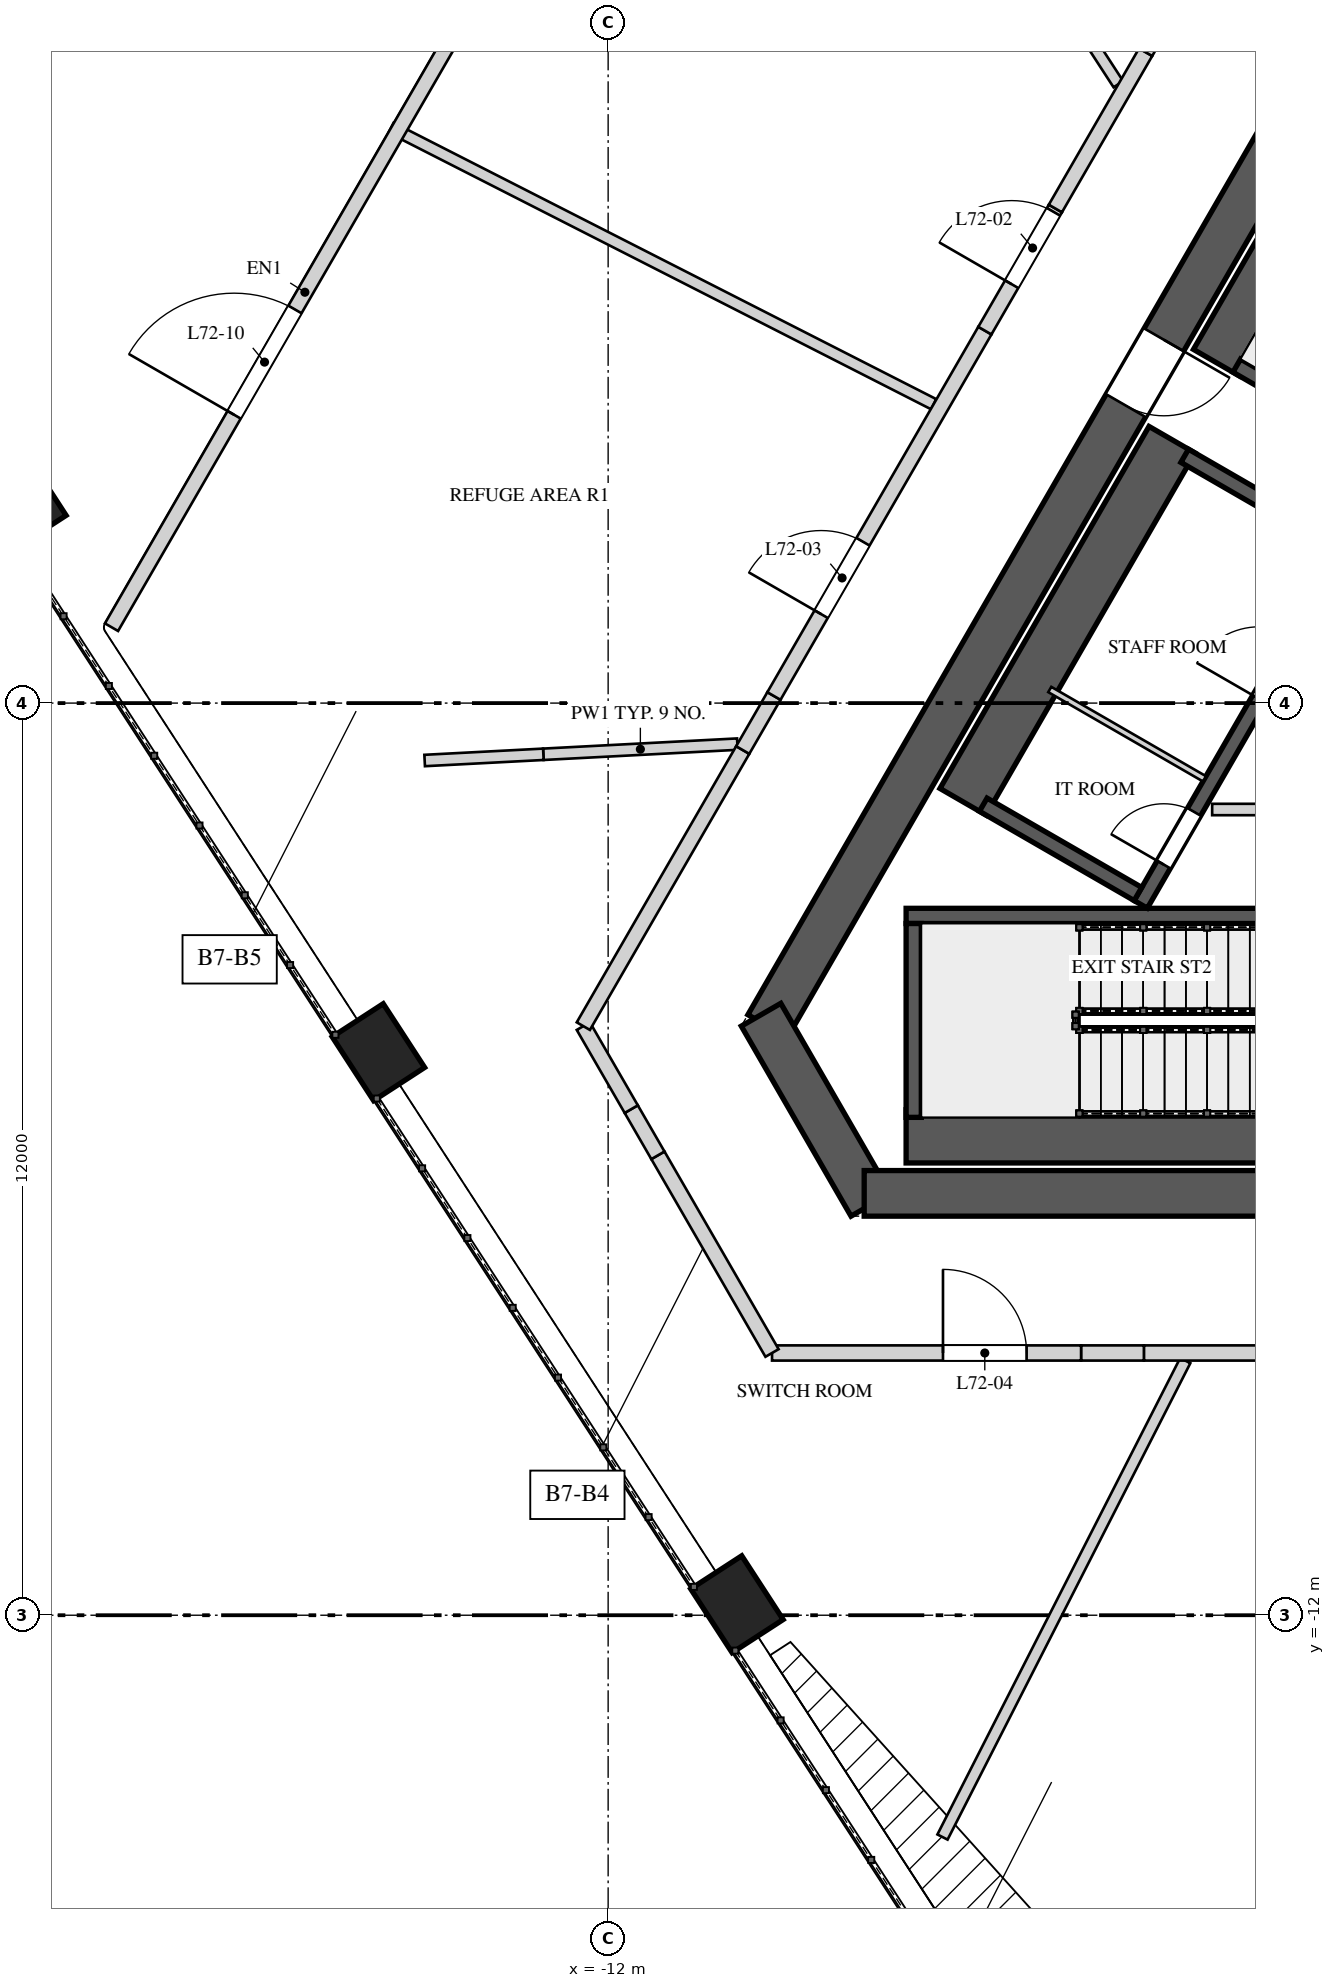
"""IFC4 building model, lengths in metres.
Left out: names, types, materials, properties, quantities, classifications, styles, units other than length and angle.
Written with IfcOpenShell. Run it as: python <this file> out.ifc"""

import sys

from ifc_helpers import new_model, si_unit, direction, frame, frame_2d, origin, origin_2d, place, context, subcontext, project, spatial, polyline, rectangle, outline, extrude, element, fill, save


model = new_model("IFC4")
c1 = context("Model", 3, precision=1e-05, world=origin(), true_north=direction((0.0, 1.0)))
c2 = subcontext(c1, "Body", "Model", "MODEL_VIEW")
j1 = project(units=[si_unit("LENGTHUNIT", "METRE"), si_unit("PLANEANGLEUNIT", "RADIAN")], contexts=[c1])
p1 = place(None, origin())
s1 = spatial("IfcSite", under=j1, at=p1, CompositionType="ELEMENT")
p2 = place(p1, origin())
s2 = spatial("IfcBuilding", under=s1, at=p2, CompositionType="ELEMENT")
p3 = place(p2, frame((0.0, 0.0, 306.4)))
s3 = spatial("IfcBuildingStorey", under=s2, at=p3, CompositionType="ELEMENT", Elevation=306.4)
p4 = place(p3, frame((-1.27, 10.7, 0.0), z_axis=(0.0, 0.0, 1.0), x_axis=(-0.499999536116, -0.866025671608, 0.0)))
e1 = element("IfcWall", 1, at=p4, inside=s3, PredefinedType="SHEAR", context=c2, shape_type="SweptSolid", body=[
    extrude(rectangle(XDim=17.263, YDim=0.6, at=frame_2d((8.631, 0.0))), origin(), (0.0, 0.0, 1.0), 14.0),
])
p5 = place(p4, frame((6.836, 0.0, 0.0)))
e2 = element("IfcOpeningElement", 2, at=p5, cuts=e1, PredefinedType="OPENING", context=c2, shape_type="SweptSolid", body=[
    extrude(rectangle(XDim=1.0, YDim=2.4, at=frame_2d((0.5, 1.2))), frame((0.0, 0.31, 0.0), z_axis=(0.0, -1.0, 0.0), x_axis=(1.0, 0.0, 0.0)), (0.0, 0.0, 1.0), 0.62),
])
p6 = place(p3, frame((-9.988, -4.1, 0.0), z_axis=(0.0, 0.0, 1.0), x_axis=(0.499995765644, -0.866027848477, 0.0)))
e3 = element("IfcWall", 3, at=p6, inside=s3, PredefinedType="SHEAR", context=c2, shape_type="SweptSolid", body=[
    extrude(rectangle(XDim=2.887, YDim=0.6, at=frame_2d((1.443, 0.0))), origin(), (0.0, 0.0, 1.0), 14.0),
])
p7 = place(p3, frame((-8.631, -6.45, 0.0), z_axis=(0.0, 0.0, 1.0), x_axis=(1.0, 0.0, 0.0)))
e4 = element("IfcWall", 4, at=p7, inside=s3, PredefinedType="SHEAR", context=c2, shape_type="SweptSolid", body=[
    extrude(rectangle(XDim=17.263, YDim=0.6, at=frame_2d((8.631, 0.0))), origin(), (0.0, 0.0, 1.0), 14.0),
])
p8 = place(p7, frame((6.836, 0.0, 0.0)))
e5 = element("IfcOpeningElement", 5, at=p8, cuts=e4, PredefinedType="OPENING", context=c2, shape_type="SweptSolid", body=[
    extrude(rectangle(XDim=1.0, YDim=2.4, at=frame_2d((0.5, 1.2))), frame((0.0, 0.31, 0.0), z_axis=(0.0, -1.0, 0.0), x_axis=(1.0, 0.0, 0.0)), (0.0, 0.0, 1.0), 0.62),
])
p9 = place(p7, frame((15.034, 0.0, 0.0)))
e6 = element("IfcOpeningElement", 6, at=p9, cuts=e4, PredefinedType="OPENING", context=c2, shape_type="SweptSolid", body=[
    extrude(rectangle(XDim=0.8, YDim=2.1, at=frame_2d((0.4, 1.05))), frame((0.0, 0.31, 0.0), z_axis=(0.0, -1.0, 0.0), x_axis=(1.0, 0.0, 0.0)), (0.0, 0.0, 1.0), 0.62),
])
for number, where, z_axis, x_axis in (
    (7, (-19.739, 2.671, 0.0), (0.0, 0.0, 1.0), (0.545, -0.839, 0.0)),
    (8, (-15.022, -4.593, 0.0), (0.0, 0.0, 1.0), (0.545, -0.839, 0.0)),
    (9, (-10.306, -11.856, 0.0), (0.0, 0.0, 1.0), (0.545, -0.839, 0.0)),
):
    element("IfcColumn", number, at=place(p3, frame(where, z_axis=z_axis, x_axis=x_axis)), inside=s3, PredefinedType="COLUMN", context=c2, shape_type="SweptSolid", body=[
        extrude(rectangle(XDim=1.0, YDim=0.8, at=origin_2d()), origin(), (0.0, 0.0, 1.0), 9.037),
    ])
p10 = place(p3, frame((-0.896, 9.847, 0.0), z_axis=(0.0, 0.0, 1.0), x_axis=(-0.500009909098, -0.866019682689, 0.0)))
e10 = element("IfcWall", 10, at=p10, inside=s3, PredefinedType="SOLIDWALL", context=c2, shape_type="SweptSolid", body=[
    extrude(rectangle(XDim=6.2, YDim=0.7, at=frame_2d((3.1, 0.0))), origin(), (0.0, 0.0, 1.0), 13.65),
])
p11 = place(p3, frame((-1.521, 3.165, 0.0), z_axis=(0.0, 0.0, 1.0), x_axis=(-0.866030925526, 0.499990435942, 0.0)))
e11 = element("IfcWall", 11, at=p11, inside=s3, PredefinedType="SOLIDWALL", context=c2, shape_type="SweptSolid", body=[
    extrude(rectangle(XDim=2.55, YDim=0.2, at=frame_2d((1.275, 0.0))), origin(), (0.0, 0.0, 1.0), 13.65),
])
p12 = place(p11, frame((0.725, 0.0, 0.0)))
e12 = element("IfcOpeningElement", 12, at=p12, cuts=e11, PredefinedType="OPENING", context=c2, shape_type="SweptSolid", body=[
    extrude(rectangle(XDim=1.1, YDim=2.4, at=frame_2d((0.55, 1.2))), frame((0.0, 0.11, 0.0), z_axis=(0.0, -1.0, 0.0), x_axis=(1.0, 0.0, 0.0)), (0.0, 0.0, 1.0), 0.22),
])
p13 = place(p3, frame((-8.08, -5.7, 0.0), z_axis=(0.0, 0.0, 1.0), x_axis=(1.0, 0.0, 0.0)))
e13 = element("IfcWall", 13, at=p13, inside=s3, PredefinedType="SOLIDWALL", context=c2, shape_type="SweptSolid", body=[
    extrude(rectangle(XDim=6.2, YDim=0.7, at=frame_2d((3.1, 0.0))), origin(), (0.0, 0.0, 1.0), 13.65),
])
p14 = place(p3, frame((-8.08, -2.8, 0.0), z_axis=(0.0, 0.0, 1.0), x_axis=(1.0, 0.0, 0.0)))
e14 = element("IfcWall", 14, at=p14, inside=s3, PredefinedType="SOLIDWALL", context=c2, shape_type="SweptSolid", body=[
    extrude(rectangle(XDim=6.2, YDim=0.2, at=frame_2d((3.1, 0.0))), origin(), (0.0, 0.0, 1.0), 13.65),
])
p15 = place(p3, frame((-7.98, -2.9, 0.0), z_axis=(0.0, 0.0, 1.0), x_axis=(0.0, -1.0, 0.0)))
e15 = element("IfcWall", 15, at=p15, inside=s3, PredefinedType="SOLIDWALL", context=c2, shape_type="SweptSolid", body=[
    extrude(rectangle(XDim=2.55, YDim=0.2, at=frame_2d((1.275, 0.0))), origin(), (0.0, 0.0, 1.0), 13.65),
])
p16 = place(p3, frame((-4.993, -2.648, 0.0), z_axis=(0.0, 0.0, 1.0), x_axis=(0.499996545922, 0.866027397988, 0.0)))
e16 = element("IfcWall", 16, at=p16, inside=s3, PredefinedType="SOLIDWALL", context=c2, shape_type="SweptSolid", body=[
    extrude(rectangle(XDim=5.5, YDim=0.2, at=frame_2d((2.75, 0.0))), origin(), (0.0, 0.0, 1.0), 13.65),
])
p17 = place(p16, frame((3.12, 0.0, 0.0)))
e17 = element("IfcOpeningElement", 17, at=p17, cuts=e16, PredefinedType="OPENING", context=c2, shape_type="SweptSolid", body=[
    extrude(rectangle(XDim=0.95, YDim=2.4, at=frame_2d((0.475, 1.2))), frame((0.0, 0.11, 0.0), z_axis=(0.0, -1.0, 0.0), x_axis=(1.0, 0.0, 0.0)), (0.0, 0.0, 1.0), 0.22),
])
p18 = place(p16, frame((0.605, 0.0, 0.0)))
e18 = element("IfcOpeningElement", 18, at=p18, cuts=e16, PredefinedType="OPENING", context=c2, shape_type="SweptSolid", body=[
    extrude(rectangle(XDim=0.8, YDim=2.1, at=frame_2d((0.4, 1.05))), frame((0.0, 0.11, 0.0), z_axis=(0.0, -1.0, 0.0), x_axis=(1.0, 0.0, 0.0)), (0.0, 0.0, 1.0), 0.22),
])
p19 = place(p3, frame((-4.581, 3.465, 0.0), z_axis=(0.0, 0.0, 1.0), x_axis=(-0.499996545922, -0.866027397988, 0.0)))
e19 = element("IfcWall", 19, at=p19, inside=s3, PredefinedType="SOLIDWALL", context=c2, shape_type="SweptSolid", body=[
    extrude(rectangle(XDim=5.5, YDim=0.7, at=frame_2d((2.75, 0.0))), origin(), (0.0, 0.0, 1.0), 13.65),
])
p20 = place(p3, frame((-2.38, 2.078, 0.0), z_axis=(0.0, 0.0, 1.0), x_axis=(-0.866061024631, 0.499938297808, 0.0)))
e20 = element("IfcWall", 20, at=p20, inside=s3, PredefinedType="SOLIDWALL", context=c2, shape_type="SweptSolid", body=[
    extrude(rectangle(XDim=2.35, YDim=0.2, at=frame_2d((1.175, 0.0))), origin(), (0.0, 0.0, 1.0), 13.65),
])
p21 = place(p3, frame((-5.03, -2.512, 0.0), z_axis=(0.0, 0.0, 1.0), x_axis=(-0.866016039709, 0.500016218704, 0.0)))
e21 = element("IfcWall", 21, at=p21, inside=s3, PredefinedType="SOLIDWALL", context=c2, shape_type="SweptSolid", body=[
    extrude(rectangle(XDim=2.35, YDim=0.2, at=frame_2d((1.175, 0.0))), origin(), (0.0, 0.0, 1.0), 13.65),
])
p22 = place(p3, frame((-4.155, -0.996, 0.0), z_axis=(0.0, 0.0, 1.0), x_axis=(-0.866016039709, 0.500016218704, 0.0)))
e22 = element("IfcWall", 22, at=p22, inside=s3, PredefinedType="PARTITIONING", context=c2, shape_type="SweptSolid", body=[
    extrude(rectangle(XDim=2.35, YDim=0.08, at=frame_2d((1.175, 0.0))), origin(), (0.0, 0.0, 1.0), 13.65),
])
p23 = place(p3, frame((-4.053, -1.4, 0.0), z_axis=(0.0, 0.0, 1.0), x_axis=(1.0, 0.0, 0.0)))
e23 = element("IfcWall", 23, at=p23, inside=s3, PredefinedType="PARTITIONING", context=c2, shape_type="SweptSolid", body=[
    extrude(rectangle(XDim=7.876, YDim=0.15, at=frame_2d((3.938, 0.0))), origin(), (0.0, 0.0, 1.0), 13.65),
])
p24 = place(p3, frame((-10.3, -0.54, 0.0), z_axis=(0.0, 0.0, 1.0), x_axis=(-0.998629151994, -0.052343259234, 0.0)))
e24 = element("IfcWall", 24, at=p24, inside=s3, PredefinedType="PARTITIONING", context=c2, shape_type="SweptSolid", body=[
    extrude(rectangle(XDim=2.556, YDim=0.15, at=frame_2d((1.278, 0.0))), origin(), (0.0, 0.0, 1.0), 12.95),
])
p25 = place(p3, frame((-12.852, -0.674, 0.0), z_axis=(0.0, 0.0, 1.0), x_axis=(-0.998631594635, -0.05229663658, 0.0)))
e25 = element("IfcWall", 25, at=p25, inside=s3, PredefinedType="PARTITIONING", context=c2, shape_type="SweptSolid", body=[
    extrude(rectangle(XDim=1.564, YDim=0.15, at=frame_2d((0.782, 0.0))), origin(), (0.0, 0.0, 1.0), 13.65),
])
p26 = place(p3, frame((-7.718, 3.932, 0.0), z_axis=(0.0, 0.0, 1.0), x_axis=(-0.891006469539, 0.453990606995, 0.0)))
e26 = element("IfcWall", 26, at=p26, inside=s3, PredefinedType="PARTITIONING", context=c2, shape_type="SweptSolid", body=[
    extrude(rectangle(XDim=8.011, YDim=0.15, at=frame_2d((4.005, 0.0))), origin(), (0.0, 0.0, 1.0), 13.65),
])
p27 = place(p3, frame((-5.287, 8.142, 0.0), z_axis=(0.0, 0.0, 1.0), x_axis=(-0.544633340221, 0.83867426616, 0.0)))
e27 = element("IfcWall", 27, at=p27, inside=s3, PredefinedType="PARTITIONING", context=c2, shape_type="SweptSolid", body=[
    extrude(rectangle(XDim=7.035, YDim=0.15, at=frame_2d((3.518, 0.0))), origin(), (0.0, 0.0, 1.0), 13.65),
])
p28 = place(p3, frame((-4.407, -8.65, 0.0), z_axis=(0.0, 0.0, 1.0), x_axis=(-0.454002721832, -0.891000296615, 0.0)))
e28 = element("IfcWall", 28, at=p28, inside=s3, PredefinedType="PARTITIONING", context=c2, shape_type="SweptSolid", body=[
    extrude(rectangle(XDim=7.035, YDim=0.15, at=frame_2d((3.518, 0.0))), origin(), (0.0, 0.0, 1.0), 13.65),
])
p29 = place(p3, frame((-2.577, -8.55, 0.0), z_axis=(0.0, 0.0, 1.0), x_axis=(-1.0, 0.0, 0.0)))
e29 = element("IfcWall", 29, at=p29, inside=s3, PredefinedType="SOLIDWALL", context=c2, shape_type="SweptSolid", body=[
    extrude(rectangle(XDim=2.375, YDim=0.2, at=frame_2d((1.188, 0.0))), origin(), (0.0, 0.0, 1.0), 13.65),
])
p30 = place(p3, frame((-4.952, -8.55, 0.0), z_axis=(0.0, 0.0, 1.0), x_axis=(-1.0, 0.0, 0.0)))
e30 = element("IfcWall", 30, at=p30, inside=s3, PredefinedType="SOLIDWALL", context=c2, shape_type="SweptSolid", body=[
    extrude(rectangle(XDim=0.826, YDim=0.2, at=frame_2d((0.413, 0.0))), origin(), (0.0, 0.0, 1.0), 12.95),
])
p31 = place(p3, frame((-9.844, -8.55, 0.0), z_axis=(0.0, 0.0, 1.0), x_axis=(1.0, 0.0, 0.0)))
e31 = element("IfcWall", 31, at=p31, inside=s3, PredefinedType="SOLIDWALL", context=c2, shape_type="SweptSolid", body=[
    extrude(rectangle(XDim=4.066, YDim=0.2, at=frame_2d((2.033, 0.0))), origin(), (0.0, 0.0, 1.0), 13.65),
])
p32 = place(p31, frame((2.249, 0.0, 0.0)))
e32 = element("IfcOpeningElement", 32, at=p32, cuts=e31, PredefinedType="OPENING", context=c2, shape_type="SweptSolid", body=[
    extrude(rectangle(XDim=1.1, YDim=2.2, at=frame_2d((0.55, 1.1))), frame((0.0, 0.11, 0.0), z_axis=(0.0, -1.0, 0.0), x_axis=(1.0, 0.0, 0.0)), (0.0, 0.0, 1.0), 0.22),
])
p33 = place(p3, frame((-9.844, -8.55, 0.0), z_axis=(0.0, 0.0, 1.0), x_axis=(-0.500003959331, 0.866023117852, 0.0)))
e33 = element("IfcWall", 33, at=p33, inside=s3, PredefinedType="SOLIDWALL", context=c2, shape_type="SweptSolid", body=[
    extrude(rectangle(XDim=3.003, YDim=0.2, at=frame_2d((1.501, 0.0))), origin(), (0.0, 0.0, 1.0), 13.65),
])
p34 = place(p3, frame((-11.345, -5.949, 0.0), z_axis=(0.0, 0.0, 1.0), x_axis=(-0.499993523031, 0.866029143232, 0.0)))
e34 = element("IfcWall", 34, at=p34, inside=s3, PredefinedType="SOLIDWALL", context=c2, shape_type="SweptSolid", body=[
    extrude(rectangle(XDim=0.702, YDim=0.2, at=frame_2d((0.351, 0.0))), origin(), (0.0, 0.0, 1.0), 12.95),
])
p35 = place(p3, frame((-11.696, -5.342, 0.0), z_axis=(0.0, 0.0, 1.0), x_axis=(-0.500013012896, 0.866017890655, 0.0)))
e35 = element("IfcWall", 35, at=p35, inside=s3, PredefinedType="SOLIDWALL", context=c2, shape_type="SweptSolid", body=[
    extrude(rectangle(XDim=1.261, YDim=0.2, at=frame_2d((0.63, 0.0))), origin(), (0.0, 0.0, 1.0), 13.65),
])
p36 = place(p3, frame((-12.326, -4.25, 0.0), z_axis=(0.0, 0.0, 1.0), x_axis=(0.499982771656, 0.866035350345, 0.0)))
e36 = element("IfcWall", 36, at=p36, inside=s3, PredefinedType="SOLIDWALL", context=c2, shape_type="SweptSolid", body=[
    extrude(rectangle(XDim=4.195, YDim=0.2, at=frame_2d((2.097, 0.0))), origin(), (0.0, 0.0, 1.0), 13.65),
])
p37 = place(p3, frame((-10.229, -0.617, 0.0), z_axis=(0.0, 0.0, 1.0), x_axis=(0.5001686003, 0.865928040471, 0.0)))
e37 = element("IfcWall", 37, at=p37, inside=s3, PredefinedType="SOLIDWALL", context=c2, shape_type="SweptSolid", body=[
    extrude(rectangle(XDim=0.821, YDim=0.2, at=frame_2d((0.411, 0.0))), origin(), (0.0, 0.0, 1.0), 12.95),
])
p38 = place(p3, frame((-9.819, 0.094, 0.0), z_axis=(0.0, 0.0, 1.0), x_axis=(0.499971228071, 0.866042014628, 0.0)))
e38 = element("IfcWall", 38, at=p38, inside=s3, PredefinedType="SOLIDWALL", context=c2, shape_type="SweptSolid", body=[
    extrude(rectangle(XDim=5.55, YDim=0.2, at=frame_2d((2.775, 0.0))), origin(), (0.0, 0.0, 1.0), 13.65),
])
p39 = place(p38, frame((1.243, 0.0, 0.0)))
e39 = element("IfcOpeningElement", 39, at=p39, cuts=e38, PredefinedType="OPENING", context=c2, shape_type="SweptSolid", body=[
    extrude(rectangle(XDim=1.1, YDim=2.2, at=frame_2d((0.55, 1.1))), frame((0.0, 0.11, 0.0), z_axis=(0.0, -1.0, 0.0), x_axis=(1.0, 0.0, 0.0)), (0.0, 0.0, 1.0), 0.22),
])
p40 = place(p3, frame((-7.044, 4.9, 0.0), z_axis=(0.0, 0.0, 1.0), x_axis=(0.500045188778, 0.865999312459, 0.0)))
e40 = element("IfcWall", 40, at=p40, inside=s3, PredefinedType="SOLIDWALL", context=c2, shape_type="SweptSolid", body=[
    extrude(outline(polyline([(0.0, 0.0), (1.855, 0.0), (1.855, 13.65), (0.807, 13.65), (0.807, 12.75), (0.0, 12.75), (0.0, 0.0)])), frame((0.0, 0.1, 0.0), z_axis=(0.0, -1.0, 0.0), x_axis=(1.0, 0.0, 0.0)), (0.0, 0.0, 1.0), 0.2),
])
p41 = place(p40, frame((0.705, 0.0, 0.0)))
e41 = element("IfcOpeningElement", 41, at=p41, cuts=e40, PredefinedType="OPENING", context=c2, shape_type="SweptSolid", body=[
    extrude(rectangle(XDim=1.1, YDim=2.2, at=frame_2d((0.55, 1.1))), frame((0.0, 0.11, 0.0), z_axis=(0.0, -1.0, 0.0), x_axis=(1.0, 0.0, 0.0)), (0.0, 0.0, 1.0), 0.22),
])
p42 = place(p3, frame((-6.116, 6.507, 0.0), z_axis=(0.0, 0.0, 1.0), x_axis=(0.499998356159, 0.866026352854, 0.0)))
e42 = element("IfcWall", 42, at=p42, inside=s3, PredefinedType="SOLIDWALL", context=c2, shape_type="SweptSolid", body=[
    extrude(rectangle(XDim=2.375, YDim=0.2, at=frame_2d((1.187, 0.0))), origin(), (0.0, 0.0, 1.0), 13.65),
])
p43 = place(p3, frame((-4.929, 8.563, 0.0), z_axis=(0.0, 0.0, 1.0), x_axis=(0.500046299512, 0.865998671098, 0.0)))
e43 = element("IfcWall", 43, at=p43, inside=s3, PredefinedType="SOLIDWALL", context=c2, shape_type="SweptSolid", body=[
    extrude(rectangle(XDim=0.827, YDim=0.2, at=frame_2d((0.413, 0.0))), origin(), (0.0, 0.0, 1.0), 12.95),
])
p44 = place(p3, frame((-18.534, 0.999, 0.0), z_axis=(0.0, 0.0, 1.0), x_axis=(0.500022177915, 0.866012598981, 0.0)))
e44 = element("IfcWall", 44, at=p44, inside=s3, PredefinedType="SOLIDWALL", context=c2, shape_type="SweptSolid", body=[
    extrude(rectangle(XDim=10.177, YDim=0.2, at=frame_2d((5.088, 0.0))), origin(), (0.0, 0.0, 1.0), 13.65),
])
p45 = place(p44, frame((3.227, 0.0, 0.0)))
e45 = element("IfcOpeningElement", 45, at=p45, cuts=e44, PredefinedType="OPENING", context=c2, shape_type="SweptSolid", body=[
    extrude(rectangle(XDim=1.6, YDim=2.3, at=frame_2d((0.8, 1.15))), frame((0.0, 0.11, 0.0), z_axis=(0.0, -1.0, 0.0), x_axis=(1.0, 0.0, 0.0)), (0.0, 0.0, 1.0), 0.22),
])
p46 = place(p18, origin())
e46 = element("IfcDoor", 46, at=p46, inside=s3, OperationType="SINGLE_SWING_RIGHT", PredefinedType="DOOR", context=c2, shape_type="SweptSolid", body=[
    extrude(rectangle(XDim=0.8, YDim=2.1, at=frame_2d((0.4, 1.05))), frame((0.0, 0.025, 0.0), z_axis=(0.0, -1.0, 0.0), x_axis=(1.0, 0.0, 0.0)), (0.0, 0.0, 1.0), 0.05),
])
fill(e18, e46)
p47 = place(p5, origin())
e47 = element("IfcDoor", 47, at=p47, inside=s3, OperationType="SINGLE_SWING_RIGHT", PredefinedType="DOOR", context=c2, shape_type="SweptSolid", body=[
    extrude(rectangle(XDim=1.0, YDim=2.4, at=frame_2d((0.5, 1.2))), frame((0.0, 0.025, 0.0), z_axis=(0.0, -1.0, 0.0), x_axis=(1.0, 0.0, 0.0)), (0.0, 0.0, 1.0), 0.05),
])
fill(e2, e47)
p48 = place(p41, origin())
e48 = element("IfcDoor", 48, at=p48, inside=s3, OperationType="SINGLE_SWING_RIGHT", PredefinedType="DOOR", context=c2, shape_type="SweptSolid", body=[
    extrude(rectangle(XDim=1.1, YDim=2.2, at=frame_2d((0.55, 1.1))), frame((0.0, 0.025, 0.0), z_axis=(0.0, -1.0, 0.0), x_axis=(1.0, 0.0, 0.0)), (0.0, 0.0, 1.0), 0.05),
])
fill(e41, e48)
p49 = place(p39, origin())
e49 = element("IfcDoor", 49, at=p49, inside=s3, OperationType="SINGLE_SWING_LEFT", PredefinedType="DOOR", context=c2, shape_type="SweptSolid", body=[
    extrude(rectangle(XDim=1.1, YDim=2.2, at=frame_2d((0.55, 1.1))), frame((0.0, 0.025, 0.0), z_axis=(0.0, -1.0, 0.0), x_axis=(1.0, 0.0, 0.0)), (0.0, 0.0, 1.0), 0.05),
])
fill(e39, e49)
p50 = place(p32, origin())
e50 = element("IfcDoor", 50, at=p50, inside=s3, OperationType="SINGLE_SWING_RIGHT", PredefinedType="DOOR", context=c2, shape_type="SweptSolid", body=[
    extrude(rectangle(XDim=1.1, YDim=2.2, at=frame_2d((0.55, 1.1))), frame((0.0, 0.025, 0.0), z_axis=(0.0, -1.0, 0.0), x_axis=(1.0, 0.0, 0.0)), (0.0, 0.0, 1.0), 0.05),
])
fill(e32, e50)
p51 = place(p45, origin())
e51 = element("IfcDoor", 51, at=p51, inside=s3, OperationType="DOUBLE_DOOR_SINGLE_SWING", PredefinedType="DOOR", context=c2, shape_type="SweptSolid", body=[
    extrude(rectangle(XDim=1.6, YDim=2.3, at=frame_2d((0.8, 1.15))), frame((0.0, 0.025, 0.0), z_axis=(0.0, -1.0, 0.0), x_axis=(1.0, 0.0, 0.0)), (0.0, 0.0, 1.0), 0.05),
])
fill(e45, e51)
save(model, sys.argv[1])
